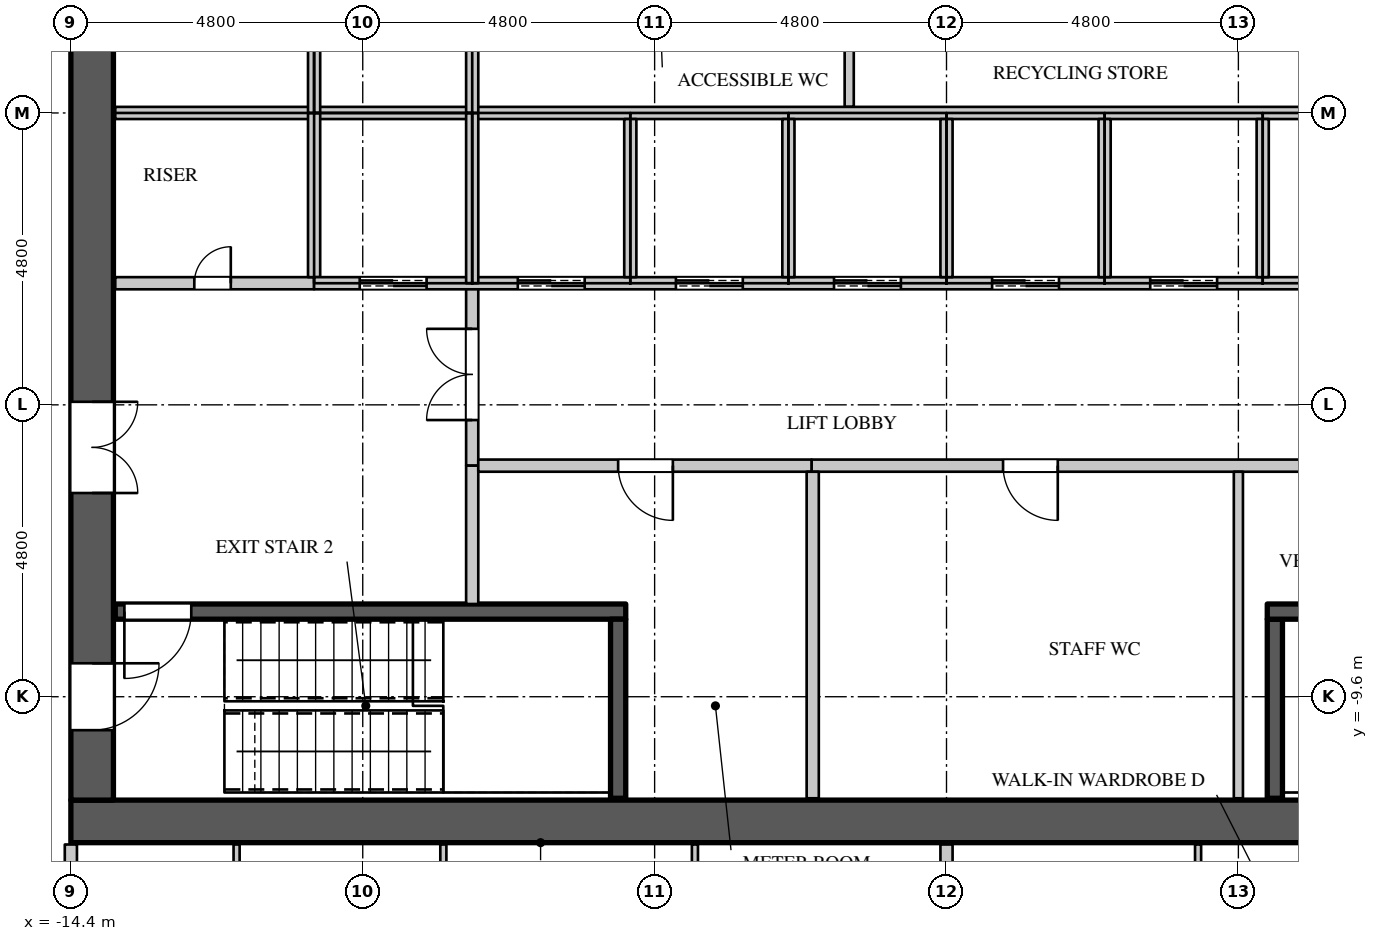
"""IFC4 building model, lengths in metres.
Left out: names, types, materials, properties, quantities, classifications, styles, units other than length and angle.
Written with IfcOpenShell. Run it as: python <this file> out.ifc"""

import sys

from ifc_helpers import new_model, si_unit, direction, frame, frame_2d, origin, place, context, subcontext, project, spatial, rectangle, extrude, element, fill, save


model = new_model("IFC4")
c1 = context("Model", 3, precision=1e-05, world=origin(), true_north=direction((0.0, 1.0)))
c2 = subcontext(c1, "Body", "Model", "MODEL_VIEW")
j1 = project(units=[si_unit("LENGTHUNIT", "METRE"), si_unit("PLANEANGLEUNIT", "RADIAN")], contexts=[c1])
p1 = place(None, origin())
s1 = spatial("IfcSite", under=j1, at=p1, CompositionType="ELEMENT")
p2 = place(p1, origin())
s2 = spatial("IfcBuilding", under=s1, at=p2, CompositionType="ELEMENT")
p3 = place(p2, frame((0.0, 0.0, 162.3)))
s3 = spatial("IfcBuildingStorey", under=s2, at=p3, CompositionType="ELEMENT", Elevation=162.3)
p4 = place(p3, frame((-14.4, -11.65, 0.0), z_axis=(0.0, 0.0, 1.0), x_axis=(1.0, 0.0, 0.0)))
e1 = element("IfcWall", 1, at=p4, inside=s3, PredefinedType="SHEAR", context=c2, shape_type="SweptSolid", body=[
    extrude(rectangle(XDim=28.8, YDim=0.7, at=frame_2d((14.4, 0.0))), origin(), (0.0, 0.0, 1.0), 4.2),
])
p5 = place(p3, frame((-14.05, -11.3, 0.0), z_axis=(0.0, 0.0, 1.0), x_axis=(0.0, 1.0, 0.0)))
e2 = element("IfcWall", 2, at=p5, inside=s3, PredefinedType="SHEAR", context=c2, shape_type="SweptSolid", body=[
    extrude(rectangle(XDim=22.6, YDim=0.7, at=frame_2d((11.3, 0.0))), origin(), (0.0, 0.0, 1.0), 4.2),
])
p6 = place(p5, frame((20.35, 0.0, 0.0)))
e3 = element("IfcOpeningElement", 3, at=p6, cuts=e2, PredefinedType="OPENING", context=c2, shape_type="SweptSolid", body=[
    extrude(rectangle(XDim=1.1, YDim=2.2, at=frame_2d((0.55, 1.1))), frame((0.0, 0.36, 0.0), z_axis=(0.0, -1.0, 0.0), x_axis=(1.0, 0.0, 0.0)), (0.0, 0.0, 1.0), 0.72),
])
p7 = place(p5, frame((1.15, 0.0, 0.0)))
e4 = element("IfcOpeningElement", 4, at=p7, cuts=e2, PredefinedType="OPENING", context=c2, shape_type="SweptSolid", body=[
    extrude(rectangle(XDim=1.1, YDim=2.2, at=frame_2d((0.55, 1.1))), frame((0.0, 0.36, 0.0), z_axis=(0.0, -1.0, 0.0), x_axis=(1.0, 0.0, 0.0)), (0.0, 0.0, 1.0), 0.72),
])
p8 = place(p5, frame((16.05, 0.0, 0.0)))
e5 = element("IfcOpeningElement", 5, at=p8, cuts=e2, PredefinedType="OPENING", context=c2, shape_type="SweptSolid", body=[
    extrude(rectangle(XDim=1.5, YDim=2.4, at=frame_2d((0.75, 1.2))), frame((0.0, 0.36, 0.0), z_axis=(0.0, -1.0, 0.0), x_axis=(1.0, 0.0, 0.0)), (0.0, 0.0, 1.0), 0.72),
])
p9 = place(p5, frame((5.05, 0.0, 0.0)))
e6 = element("IfcOpeningElement", 6, at=p9, cuts=e2, PredefinedType="OPENING", context=c2, shape_type="SweptSolid", body=[
    extrude(rectangle(XDim=1.5, YDim=2.4, at=frame_2d((0.75, 1.2))), frame((0.0, 0.36, 0.0), z_axis=(0.0, -1.0, 0.0), x_axis=(1.0, 0.0, 0.0)), (0.0, 0.0, 1.0), 0.72),
])
p10 = place(p3, frame((-14.4, -14.3, 0.0), z_axis=(0.0, 0.0, 1.0), x_axis=(0.0, 1.0, 0.0)))
e7 = element("IfcWall", 7, at=p10, inside=s3, PredefinedType="PARTITIONING", context=c2, shape_type="SweptSolid", body=[
    extrude(rectangle(XDim=2.27, YDim=0.2, at=frame_2d((1.135, 0.0))), origin(), (0.0, 0.0, 1.0), 3.95),
])
p11 = place(p3, frame((-7.8, -5.8, 0.0), z_axis=(0.0, 0.0, 1.0), x_axis=(0.0, 1.0, 0.0)))
e8 = element("IfcWall", 8, at=p11, inside=s3, PredefinedType="PARTITIONING", context=c2, shape_type="SweptSolid", body=[
    extrude(rectangle(XDim=3.0, YDim=0.2, at=frame_2d((1.5, 0.0))), origin(), (0.0, 0.0, 1.0), 3.95),
])
p12 = place(p11, frame((0.75, 0.0, 0.0)))
e9 = element("IfcOpeningElement", 9, at=p12, cuts=e8, PredefinedType="OPENING", context=c2, shape_type="SweptSolid", body=[
    extrude(rectangle(XDim=1.5, YDim=2.4, at=frame_2d((0.75, 1.2))), frame((0.0, 0.11, 0.0), z_axis=(0.0, -1.0, 0.0), x_axis=(1.0, 0.0, 0.0)), (0.0, 0.0, 1.0), 0.22),
])
p13 = place(p3, frame((-2.22, -5.8, 0.0), z_axis=(0.0, 0.0, 1.0), x_axis=(1.0, 0.0, 0.0)))
e10 = element("IfcWall", 10, at=p13, inside=s3, PredefinedType="PARTITIONING", context=c2, shape_type="SweptSolid", body=[
    extrude(rectangle(XDim=15.89, YDim=0.2, at=frame_2d((7.945, 0.0))), origin(), (0.0, 0.0, 1.0), 3.95),
])
p14 = place(p13, frame((3.15, 0.0, 0.0)))
e11 = element("IfcOpeningElement", 11, at=p14, cuts=e10, PredefinedType="OPENING", context=c2, shape_type="SweptSolid", body=[
    extrude(rectangle(XDim=0.9, YDim=2.2, at=frame_2d((0.45, 1.1))), frame((0.0, 0.11, 0.0), z_axis=(0.0, -1.0, 0.0), x_axis=(1.0, 0.0, 0.0)), (0.0, 0.0, 1.0), 0.22),
])
p15 = place(p13, frame((8.5, 0.0, 0.0)))
e12 = element("IfcOpeningElement", 12, at=p15, cuts=e10, PredefinedType="OPENING", context=c2, shape_type="SweptSolid", body=[
    extrude(rectangle(XDim=0.9, YDim=2.2, at=frame_2d((0.45, 1.1))), frame((0.0, 0.11, 0.0), z_axis=(0.0, -1.0, 0.0), x_axis=(1.0, 0.0, 0.0)), (0.0, 0.0, 1.0), 0.22),
])
p16 = place(p13, frame((12.8, 0.0, 0.0)))
e13 = element("IfcOpeningElement", 13, at=p16, cuts=e10, PredefinedType="OPENING", context=c2, shape_type="SweptSolid", body=[
    extrude(rectangle(XDim=0.9, YDim=2.2, at=frame_2d((0.45, 1.1))), frame((0.0, 0.11, 0.0), z_axis=(0.0, -1.0, 0.0), x_axis=(1.0, 0.0, 0.0)), (0.0, 0.0, 1.0), 0.22),
])
p17 = place(p3, frame((-1.6, 0.1, 0.0), z_axis=(0.0, 0.0, 1.0), x_axis=(0.0, 1.0, 0.0)))
e14 = element("IfcWall", 14, at=p17, inside=s3, PredefinedType="PARTITIONING", context=c2, shape_type="SweptSolid", body=[
    extrude(rectangle(XDim=2.6, YDim=0.15, at=frame_2d((1.3, 0.0))), origin(), (0.0, 0.0, 1.0), 3.95),
])
p18 = place(p3, frame((4.8, -11.27, 0.0), z_axis=(0.0, 0.0, 1.0), x_axis=(0.0, 1.0, 0.0)))
e15 = element("IfcWall", 15, at=p18, inside=s3, PredefinedType="PARTITIONING", context=c2, shape_type="SweptSolid", body=[
    extrude(rectangle(XDim=5.37, YDim=0.15, at=frame_2d((2.685, 0.0))), origin(), (0.0, 0.0, 1.0), 3.95),
])
p19 = place(p3, frame((0.0, -24.055, 0.0), z_axis=(0.0, 0.0, 1.0), x_axis=(0.0, 1.0, 0.0)))
e16 = element("IfcWall", 16, at=p19, inside=s3, PredefinedType="PARTITIONING", context=c2, shape_type="SweptSolid", body=[
    extrude(rectangle(XDim=12.025, YDim=0.2, at=frame_2d((6.012, 0.0))), origin(), (0.0, 0.0, 1.0), 3.95),
])
p20 = place(p3, frame((-13.67, -2.8, 0.0), z_axis=(0.0, 0.0, 1.0), x_axis=(1.0, 0.0, 0.0)))
e17 = element("IfcWall", 17, at=p20, inside=s3, PredefinedType="PARTITIONING", context=c2, shape_type="SweptSolid", body=[
    extrude(rectangle(XDim=3.27, YDim=0.2, at=frame_2d((1.635, 0.0))), origin(), (0.0, 0.0, 1.0), 3.95),
])
p21 = place(p20, frame((1.3, 0.0, 0.0)))
e18 = element("IfcOpeningElement", 18, at=p21, cuts=e17, PredefinedType="OPENING", context=c2, shape_type="SweptSolid", body=[
    extrude(rectangle(XDim=0.6, YDim=2.0, at=frame_2d((0.3, 1.0))), frame((0.0, 0.11, 0.0), z_axis=(0.0, -1.0, 0.0), x_axis=(1.0, 0.0, 0.0)), (0.0, 0.0, 1.0), 0.22),
])
p22 = place(p3, frame((-7.8, -8.075, 0.0), z_axis=(0.0, 0.0, 1.0), x_axis=(0.0, 1.0, 0.0)))
e19 = element("IfcWall", 19, at=p22, inside=s3, PredefinedType="PARTITIONING", context=c2, shape_type="SweptSolid", body=[
    extrude(rectangle(XDim=2.275, YDim=0.2, at=frame_2d((1.137, 0.0))), origin(), (0.0, 0.0, 1.0), 3.95),
])
p23 = place(p3, frame((-7.7, -5.8, 0.0), z_axis=(0.0, 0.0, 1.0), x_axis=(1.0, 0.0, 0.0)))
e20 = element("IfcWall", 20, at=p23, inside=s3, PredefinedType="PARTITIONING", context=c2, shape_type="SweptSolid", body=[
    extrude(rectangle(XDim=5.48, YDim=0.2, at=frame_2d((2.74, 0.0))), origin(), (0.0, 0.0, 1.0), 3.95),
])
p24 = place(p23, frame((2.3, 0.0, 0.0)))
e21 = element("IfcOpeningElement", 21, at=p24, cuts=e20, PredefinedType="OPENING", context=c2, shape_type="SweptSolid", body=[
    extrude(rectangle(XDim=0.9, YDim=2.2, at=frame_2d((0.45, 1.1))), frame((0.0, 0.11, 0.0), z_axis=(0.0, -1.0, 0.0), x_axis=(1.0, 0.0, 0.0)), (0.0, 0.0, 1.0), 0.22),
])
p25 = place(p3, frame((-2.2, -11.27, 0.0), z_axis=(0.0, 0.0, 1.0), x_axis=(0.0, 1.0, 0.0)))
e22 = element("IfcWall", 22, at=p25, inside=s3, PredefinedType="PARTITIONING", context=c2, shape_type="SweptSolid", body=[
    extrude(rectangle(XDim=5.37, YDim=0.2, at=frame_2d((2.685, 0.0))), origin(), (0.0, 0.0, 1.0), 3.95),
])
p26 = place(p3, frame((-13.67, 0.0, 0.0), z_axis=(0.0, 0.0, 1.0), x_axis=(1.0, 0.0, 0.0)))
e23 = element("IfcWall", 23, at=p26, inside=s3, PredefinedType="PARTITIONING", context=c2, shape_type="SweptSolid", body=[
    extrude(rectangle(XDim=21.47, YDim=0.2, at=frame_2d((10.735, 0.0))), origin(), (0.0, 0.0, 1.0), 3.95),
])
p27 = place(p3, frame((-10.4, -2.7, 0.0), z_axis=(0.0, 0.0, 1.0), x_axis=(0.0, 1.0, 0.0)))
e24 = element("IfcWall", 24, at=p27, inside=s3, PredefinedType="PARTITIONING", context=c2, shape_type="SweptSolid", body=[
    extrude(rectangle(XDim=2.7, YDim=0.2, at=frame_2d((1.35, 0.0))), origin(), (0.0, 0.0, 1.0), 3.95),
])
p28 = place(p3, frame((-10.4, -2.8, 0.0), z_axis=(0.0, 0.0, 1.0), x_axis=(1.0, 0.0, 0.0)))
e25 = element("IfcWall", 25, at=p28, inside=s3, PredefinedType="PARTITIONING", context=c2, shape_type="SweptSolid", body=[
    extrude(rectangle(XDim=18.2, YDim=0.2, at=frame_2d((9.1, 0.0))), origin(), (0.0, 0.0, 1.0), 3.95),
])
p29 = place(p28, frame((0.75, 0.0, 0.0)))
e26 = element("IfcOpeningElement", 26, at=p29, cuts=e25, PredefinedType="OPENING", context=c2, shape_type="SweptSolid", body=[
    extrude(rectangle(XDim=1.1, YDim=2.2, at=frame_2d((0.55, 1.1))), frame((0.0, 0.11, 0.0), z_axis=(0.0, -1.0, 0.0), x_axis=(1.0, 0.0, 0.0)), (0.0, 0.0, 1.0), 0.22),
])
p30 = place(p28, frame((3.35, 0.0, 0.0)))
e27 = element("IfcOpeningElement", 27, at=p30, cuts=e25, PredefinedType="OPENING", context=c2, shape_type="SweptSolid", body=[
    extrude(rectangle(XDim=1.1, YDim=2.2, at=frame_2d((0.55, 1.1))), frame((0.0, 0.11, 0.0), z_axis=(0.0, -1.0, 0.0), x_axis=(1.0, 0.0, 0.0)), (0.0, 0.0, 1.0), 0.22),
])
p31 = place(p28, frame((5.95, 0.0, 0.0)))
e28 = element("IfcOpeningElement", 28, at=p31, cuts=e25, PredefinedType="OPENING", context=c2, shape_type="SweptSolid", body=[
    extrude(rectangle(XDim=1.1, YDim=2.2, at=frame_2d((0.55, 1.1))), frame((0.0, 0.11, 0.0), z_axis=(0.0, -1.0, 0.0), x_axis=(1.0, 0.0, 0.0)), (0.0, 0.0, 1.0), 0.22),
])
p32 = place(p28, frame((8.55, 0.0, 0.0)))
e29 = element("IfcOpeningElement", 29, at=p32, cuts=e25, PredefinedType="OPENING", context=c2, shape_type="SweptSolid", body=[
    extrude(rectangle(XDim=1.1, YDim=2.2, at=frame_2d((0.55, 1.1))), frame((0.0, 0.11, 0.0), z_axis=(0.0, -1.0, 0.0), x_axis=(1.0, 0.0, 0.0)), (0.0, 0.0, 1.0), 0.22),
])
p33 = place(p28, frame((11.15, 0.0, 0.0)))
e30 = element("IfcOpeningElement", 30, at=p33, cuts=e25, PredefinedType="OPENING", context=c2, shape_type="SweptSolid", body=[
    extrude(rectangle(XDim=1.1, YDim=2.2, at=frame_2d((0.55, 1.1))), frame((0.0, 0.11, 0.0), z_axis=(0.0, -1.0, 0.0), x_axis=(1.0, 0.0, 0.0)), (0.0, 0.0, 1.0), 0.22),
])
p34 = place(p28, frame((13.75, 0.0, 0.0)))
e31 = element("IfcOpeningElement", 31, at=p34, cuts=e25, PredefinedType="OPENING", context=c2, shape_type="SweptSolid", body=[
    extrude(rectangle(XDim=1.1, YDim=2.2, at=frame_2d((0.55, 1.1))), frame((0.0, 0.11, 0.0), z_axis=(0.0, -1.0, 0.0), x_axis=(1.0, 0.0, 0.0)), (0.0, 0.0, 1.0), 0.22),
])
p35 = place(p28, frame((16.35, 0.0, 0.0)))
e32 = element("IfcOpeningElement", 32, at=p35, cuts=e25, PredefinedType="OPENING", context=c2, shape_type="SweptSolid", body=[
    extrude(rectangle(XDim=1.1, YDim=2.2, at=frame_2d((0.55, 1.1))), frame((0.0, 0.11, 0.0), z_axis=(0.0, -1.0, 0.0), x_axis=(1.0, 0.0, 0.0)), (0.0, 0.0, 1.0), 0.22),
])
p36 = place(p3, frame((-10.4, 0.0, 0.0), z_axis=(0.0, 0.0, 1.0), x_axis=(0.0, 1.0, 0.0)))
e33 = element("IfcWall", 33, at=p36, inside=s3, PredefinedType="PARTITIONING", context=c2, shape_type="SweptSolid", body=[
    extrude(rectangle(XDim=2.7, YDim=0.2, at=frame_2d((1.35, 0.0))), origin(), (0.0, 0.0, 1.0), 3.95),
])
for number, where, z_axis, x_axis in (
    (34, (-7.8, -2.8, 0.0), (0.0, 0.0, 1.0), (0.0, 1.0, 0.0)),
    (35, (-7.8, 0.0, 0.0), (0.0, 0.0, 1.0), (0.0, 1.0, 0.0)),
):
    element("IfcWall", number, at=place(p3, frame(where, z_axis=z_axis, x_axis=x_axis)), inside=s3, PredefinedType="PARTITIONING", context=c2, shape_type="SweptSolid", body=[
        extrude(rectangle(XDim=2.8, YDim=0.2, at=frame_2d((1.4, 0.0))), origin(), (0.0, 0.0, 1.0), 3.95),
    ])
for number, where, z_axis, x_axis in (
    (36, (-5.2, -2.7, 0.0), (0.0, 0.0, 1.0), (0.0, 1.0, 0.0)),
    (37, (-2.6, -2.7, 0.0), (0.0, 0.0, 1.0), (0.0, 1.0, 0.0)),
    (38, (0.0, -2.7, 0.0), (0.0, 0.0, 1.0), (0.0, 1.0, 0.0)),
    (39, (2.6, -2.7, 0.0), (0.0, 0.0, 1.0), (0.0, 1.0, 0.0)),
    (40, (5.2, -2.7, 0.0), (0.0, 0.0, 1.0), (0.0, 1.0, 0.0)),
):
    element("IfcWall", number, at=place(p3, frame(where, z_axis=z_axis, x_axis=x_axis)), inside=s3, PredefinedType="PARTITIONING", context=c2, shape_type="SweptSolid", body=[
        extrude(rectangle(XDim=2.6, YDim=0.2, at=frame_2d((1.3, 0.0))), origin(), (0.0, 0.0, 1.0), 3.95),
    ])
p37 = place(p3, frame((-13.67, -8.2, 0.0), z_axis=(0.0, 0.0, 1.0), x_axis=(1.0, 0.0, 0.0)))
e41 = element("IfcWall", 41, at=p37, inside=s3, PredefinedType="SHEAR", context=c2, shape_type="SweptSolid", body=[
    extrude(rectangle(XDim=8.395, YDim=0.25, at=frame_2d((4.198, 0.0))), origin(), (0.0, 0.0, 1.0), 3.95),
])
p38 = place(p37, frame((0.15, 0.0, 0.0)))
e42 = element("IfcOpeningElement", 42, at=p38, cuts=e41, PredefinedType="OPENING", context=c2, shape_type="SweptSolid", body=[
    extrude(rectangle(XDim=1.1, YDim=2.2, at=frame_2d((0.55, 1.1))), frame((0.0, 0.135, 0.0), z_axis=(0.0, -1.0, 0.0), x_axis=(1.0, 0.0, 0.0)), (0.0, 0.0, 1.0), 0.27),
])
for number, where, z_axis, x_axis in (
    (43, (-5.4, -11.27, 0.0), (0.0, 0.0, 1.0), (0.0, 1.0, 0.0)),
    (44, (5.4, -11.27, 0.0), (0.0, 0.0, 1.0), (0.0, 1.0, 0.0)),
):
    element("IfcWall", number, at=place(p3, frame(where, z_axis=z_axis, x_axis=x_axis)), inside=s3, PredefinedType="SHEAR", context=c2, shape_type="SweptSolid", body=[
        extrude(rectangle(XDim=2.945, YDim=0.25, at=frame_2d((1.473, 0.0))), origin(), (0.0, 0.0, 1.0), 3.95),
    ])
p39 = place(p3, frame((5.275, -8.2, 0.0), z_axis=(0.0, 0.0, 1.0), x_axis=(1.0, 0.0, 0.0)))
e45 = element("IfcWall", 45, at=p39, inside=s3, PredefinedType="SHEAR", context=c2, shape_type="SweptSolid", body=[
    extrude(rectangle(XDim=8.395, YDim=0.25, at=frame_2d((4.198, 0.0))), origin(), (0.0, 0.0, 1.0), 3.95),
])
p40 = place(p3, frame((-11.675, -14.925, 0.0), z_axis=(0.0, 0.0, 1.0), x_axis=(0.0, 1.0, 0.0)))
e46 = element("IfcWall", 46, at=p40, inside=s3, PredefinedType="PARTITIONING", context=c2, shape_type="SweptSolid", body=[
    extrude(rectangle(XDim=2.895, YDim=0.1, at=frame_2d((1.448, 0.0))), origin(), (0.0, 0.0, 1.0), 3.95),
])
p41 = place(p40, frame((0.95, 0.0, 0.0)))
e47 = element("IfcOpeningElement", 47, at=p41, cuts=e46, PredefinedType="OPENING", context=c2, shape_type="SweptSolid", body=[
    extrude(rectangle(XDim=0.9, YDim=2.2, at=frame_2d((0.45, 1.1))), frame((0.0, 0.06, 0.0), z_axis=(0.0, -1.0, 0.0), x_axis=(1.0, 0.0, 0.0)), (0.0, 0.0, 1.0), 0.12),
])
p42 = place(p3, frame((-8.274, -14.98, 0.0), z_axis=(0.0, 0.0, 1.0), x_axis=(0.0, 1.0, 0.0)))
e48 = element("IfcWall", 48, at=p42, inside=s3, PredefinedType="PARTITIONING", context=c2, shape_type="SweptSolid", body=[
    extrude(rectangle(XDim=2.95, YDim=0.1, at=frame_2d((1.475, 0.0))), origin(), (0.0, 0.0, 1.0), 3.95),
])
for number, where, z_axis, x_axis in (
    (49, (-4.137, -17.325, 0.0), (0.0, 0.0, 1.0), (0.0, 1.0, 0.0)),
    (50, (4.137, -17.325, 0.0), (0.0, 0.0, 1.0), (0.0, 1.0, 0.0)),
):
    element("IfcWall", number, at=place(p3, frame(where, z_axis=z_axis, x_axis=x_axis)), inside=s3, PredefinedType="PARTITIONING", context=c2, shape_type="SweptSolid", body=[
        extrude(rectangle(XDim=5.295, YDim=0.1, at=frame_2d((2.647, 0.0))), origin(), (0.0, 0.0, 1.0), 3.35),
    ])
p43 = place(p21, origin())
e51 = element("IfcDoor", 51, at=p43, inside=s3, OperationType="SINGLE_SWING_RIGHT", PredefinedType="DOOR", context=c2, shape_type="SweptSolid", body=[
    extrude(rectangle(XDim=0.6, YDim=2.0, at=frame_2d((0.3, 1.0))), frame((0.0, 0.025, 0.0), z_axis=(0.0, -1.0, 0.0), x_axis=(1.0, 0.0, 0.0)), (0.0, 0.0, 1.0), 0.05),
])
fill(e18, e51)
p44 = place(p24, origin())
e52 = element("IfcDoor", 52, at=p44, inside=s3, OperationType="SINGLE_SWING_LEFT", PredefinedType="DOOR", context=c2, shape_type="SweptSolid", body=[
    extrude(rectangle(XDim=0.9, YDim=2.2, at=frame_2d((0.45, 1.1))), frame((0.0, 0.025, 0.0), z_axis=(0.0, -1.0, 0.0), x_axis=(1.0, 0.0, 0.0)), (0.0, 0.0, 1.0), 0.05),
])
fill(e21, e52)
p45 = place(p14, origin())
e53 = element("IfcDoor", 53, at=p45, inside=s3, OperationType="SINGLE_SWING_LEFT", PredefinedType="DOOR", context=c2, shape_type="SweptSolid", body=[
    extrude(rectangle(XDim=0.9, YDim=2.2, at=frame_2d((0.45, 1.1))), frame((0.0, 0.025, 0.0), z_axis=(0.0, -1.0, 0.0), x_axis=(1.0, 0.0, 0.0)), (0.0, 0.0, 1.0), 0.05),
])
fill(e11, e53)
p46 = place(p29, origin())
e54 = element("IfcDoor", 54, at=p46, inside=s3, OperationType="DOUBLE_DOOR_SLIDING", PredefinedType="DOOR", context=c2, shape_type="SweptSolid", body=[
    extrude(rectangle(XDim=1.1, YDim=2.2, at=frame_2d((0.55, 1.1))), frame((0.0, 0.025, 0.0), z_axis=(0.0, -1.0, 0.0), x_axis=(1.0, 0.0, 0.0)), (0.0, 0.0, 1.0), 0.05),
])
fill(e26, e54)
p47 = place(p30, origin())
e55 = element("IfcDoor", 55, at=p47, inside=s3, OperationType="DOUBLE_DOOR_SLIDING", PredefinedType="DOOR", context=c2, shape_type="SweptSolid", body=[
    extrude(rectangle(XDim=1.1, YDim=2.2, at=frame_2d((0.55, 1.1))), frame((0.0, 0.025, 0.0), z_axis=(0.0, -1.0, 0.0), x_axis=(1.0, 0.0, 0.0)), (0.0, 0.0, 1.0), 0.05),
])
fill(e27, e55)
p48 = place(p31, origin())
e56 = element("IfcDoor", 56, at=p48, inside=s3, OperationType="DOUBLE_DOOR_SLIDING", PredefinedType="DOOR", context=c2, shape_type="SweptSolid", body=[
    extrude(rectangle(XDim=1.1, YDim=2.2, at=frame_2d((0.55, 1.1))), frame((0.0, 0.025, 0.0), z_axis=(0.0, -1.0, 0.0), x_axis=(1.0, 0.0, 0.0)), (0.0, 0.0, 1.0), 0.05),
])
fill(e28, e56)
p49 = place(p32, origin())
e57 = element("IfcDoor", 57, at=p49, inside=s3, OperationType="DOUBLE_DOOR_SLIDING", PredefinedType="DOOR", context=c2, shape_type="SweptSolid", body=[
    extrude(rectangle(XDim=1.1, YDim=2.2, at=frame_2d((0.55, 1.1))), frame((0.0, 0.025, 0.0), z_axis=(0.0, -1.0, 0.0), x_axis=(1.0, 0.0, 0.0)), (0.0, 0.0, 1.0), 0.05),
])
fill(e29, e57)
p50 = place(p33, origin())
e58 = element("IfcDoor", 58, at=p50, inside=s3, OperationType="DOUBLE_DOOR_SLIDING", PredefinedType="DOOR", context=c2, shape_type="SweptSolid", body=[
    extrude(rectangle(XDim=1.1, YDim=2.2, at=frame_2d((0.55, 1.1))), frame((0.0, 0.025, 0.0), z_axis=(0.0, -1.0, 0.0), x_axis=(1.0, 0.0, 0.0)), (0.0, 0.0, 1.0), 0.05),
])
fill(e30, e58)
p51 = place(p34, origin())
e59 = element("IfcDoor", 59, at=p51, inside=s3, OperationType="DOUBLE_DOOR_SLIDING", PredefinedType="DOOR", context=c2, shape_type="SweptSolid", body=[
    extrude(rectangle(XDim=1.1, YDim=2.2, at=frame_2d((0.55, 1.1))), frame((0.0, 0.025, 0.0), z_axis=(0.0, -1.0, 0.0), x_axis=(1.0, 0.0, 0.0)), (0.0, 0.0, 1.0), 0.05),
])
fill(e31, e59)
p52 = place(p38, origin())
e60 = element("IfcDoor", 60, at=p52, inside=s3, OperationType="SINGLE_SWING_RIGHT", PredefinedType="DOOR", context=c2, shape_type="SweptSolid", body=[
    extrude(rectangle(XDim=1.1, YDim=2.2, at=frame_2d((0.55, 1.1))), frame((0.0, 0.025, 0.0), z_axis=(0.0, -1.0, 0.0), x_axis=(1.0, 0.0, 0.0)), (0.0, 0.0, 1.0), 0.05),
])
fill(e42, e60)
p53 = place(p12, origin())
e61 = element("IfcDoor", 61, at=p53, inside=s3, OperationType="DOUBLE_DOOR_SINGLE_SWING", PredefinedType="DOOR", context=c2, shape_type="SweptSolid", body=[
    extrude(rectangle(XDim=1.5, YDim=2.4, at=frame_2d((0.75, 1.2))), frame((0.0, 0.025, 0.0), z_axis=(0.0, -1.0, 0.0), x_axis=(1.0, 0.0, 0.0)), (0.0, 0.0, 1.0), 0.05),
])
fill(e9, e61)
p54 = place(p7, origin())
e62 = element("IfcDoor", 62, at=p54, inside=s3, OperationType="SINGLE_SWING_LEFT", PredefinedType="DOOR", context=c2, shape_type="SweptSolid", body=[
    extrude(rectangle(XDim=1.1, YDim=2.2, at=frame_2d((0.55, 1.1))), frame((0.0, -0.295, 0.0), z_axis=(0.0, -1.0, 0.0), x_axis=(1.0, 0.0, 0.0)), (0.0, 0.0, 1.0), 0.05),
])
fill(e4, e62)
p55 = place(p9, origin())
e63 = element("IfcDoor", 63, at=p55, inside=s3, OperationType="DOUBLE_DOOR_SINGLE_SWING", PredefinedType="DOOR", context=c2, shape_type="SweptSolid", body=[
    extrude(rectangle(XDim=1.5, YDim=2.4, at=frame_2d((0.75, 1.2))), frame((0.0, -0.295, 0.0), z_axis=(0.0, -1.0, 0.0), x_axis=(1.0, 0.0, 0.0)), (0.0, 0.0, 1.0), 0.05),
])
fill(e6, e63)
save(model, sys.argv[1])
